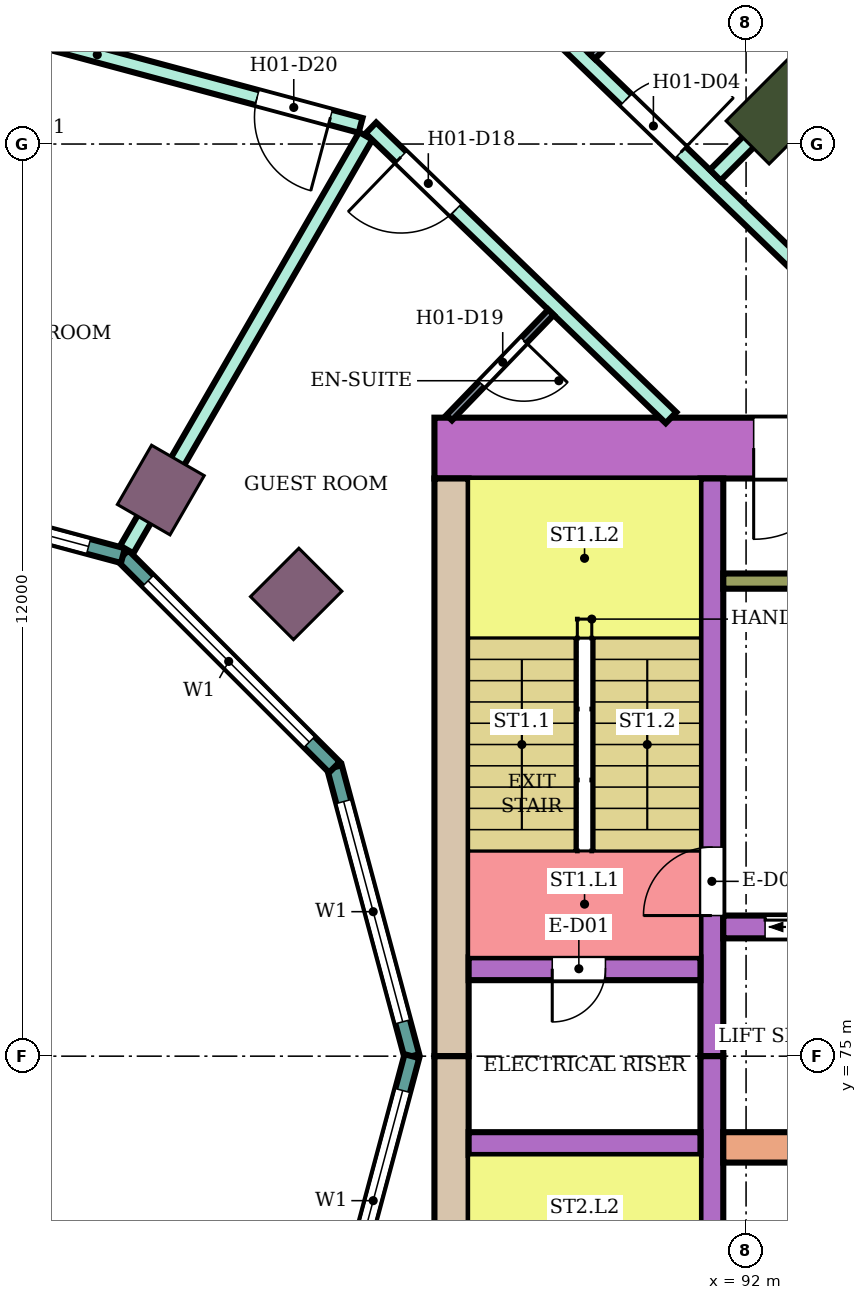
"""IFC4 building model, lengths in metres.
Left out: names, types, materials, properties, quantities, classifications, styles, units other than length and angle.
Written with IfcOpenShell. Run it as: python <this file> out.ifc"""

import sys

from ifc_helpers import new_model, si_unit, direction, frame, frame_2d, origin, origin_2d, place, context, subcontext, project, spatial, rectangle, extrude, element, fill, save


model = new_model("IFC4")
c1 = context("Model", 3, precision=1e-05, world=origin(), true_north=direction((0.0, 1.0)))
c2 = subcontext(c1, "Body", "Model", "MODEL_VIEW")
j1 = project(units=[si_unit("LENGTHUNIT", "METRE"), si_unit("PLANEANGLEUNIT", "RADIAN")], contexts=[c1])
p1 = place(None, origin())
s1 = spatial("IfcSite", under=j1, at=p1, CompositionType="ELEMENT")
p2 = place(p1, origin())
s2 = spatial("IfcBuilding", under=s1, at=p2, CompositionType="ELEMENT")
p3 = place(p2, frame((0.0, 0.0, 32.6)))
s3 = spatial("IfcBuildingStorey", under=s2, at=p3, CompositionType="ELEMENT", Elevation=32.6)
p4 = place(p3, frame((92.445, 87.445, 0.0), z_axis=(0.0, 0.0, 1.0), x_axis=(0.707106781187, 0.707106781187, 0.0)))
e1 = element("IfcColumn", 1, at=p4, inside=s3, PredefinedType="COLUMN", context=c2, shape_type="SweptSolid", body=[
    extrude(rectangle(XDim=1.2, YDim=0.8, at=origin_2d()), origin(), (0.0, 0.0, 1.0), 3.8),
])
for number, where, z_axis, x_axis in (
    (2, (86.081, 81.081, 0.0), (0.0, 0.0, 1.0), (0.707, 0.707, 0.0)),
    (3, (84.3, 82.448, 0.0), (0.0, 0.0, 1.0), (0.5, 0.866, 0.0)),
):
    element("IfcColumn", number, at=place(p3, frame(where, z_axis=z_axis, x_axis=x_axis)), inside=s3, PredefinedType="COLUMN", context=c2, shape_type="SweptSolid", body=[
        extrude(rectangle(XDim=0.9, YDim=0.8, at=origin_2d()), origin(), (0.0, 0.0, 1.0), 3.8),
    ])
p5 = place(p3, frame((87.9, 83.0, 0.0), z_axis=(0.0, 0.0, 1.0), x_axis=(1.0, 0.0, 0.0)))
e4 = element("IfcWall", 4, at=p5, inside=s3, PredefinedType="SHEAR", context=c2, shape_type="SweptSolid", body=[
    extrude(rectangle(XDim=14.7, YDim=0.8, at=frame_2d((7.35, 0.0))), origin(), (0.0, 0.0, 1.0), 3.48),
])
p6 = place(p5, frame((4.2, 0.0, 0.0)))
e5 = element("IfcOpeningElement", 5, at=p6, cuts=e4, PredefinedType="OPENING", context=c2, shape_type="SweptSolid", body=[
    extrude(rectangle(XDim=2.4, YDim=2.4, at=frame_2d((1.2, 1.2))), frame((0.0, 0.41, 0.0), z_axis=(0.0, -1.0, 0.0), x_axis=(1.0, 0.0, 0.0)), (0.0, 0.0, 1.0), 0.82),
])
for number, where, z_axis, x_axis in (
    (6, (88.125, 75.0, 0.0), (0.0, 0.0, 1.0), (0.0, 1.0, 0.0)),
    (7, (88.125, 67.4, 0.0), (0.0, 0.0, 1.0), (0.0, 1.0, 0.0)),
):
    element("IfcWall", number, at=place(p3, frame(where, z_axis=z_axis, x_axis=x_axis)), inside=s3, PredefinedType="SHEAR", context=c2, shape_type="SweptSolid", body=[
        extrude(rectangle(XDim=7.6, YDim=0.45, at=frame_2d((3.8, 0.0))), origin(), (0.0, 0.0, 1.0), 3.48),
    ])
p7 = place(p3, frame((91.55, 75.0, 0.0), z_axis=(0.0, 0.0, 1.0), x_axis=(0.0, 1.0, 0.0)))
e8 = element("IfcWall", 8, at=p7, inside=s3, PredefinedType="SHEAR", context=c2, shape_type="SweptSolid", body=[
    extrude(rectangle(XDim=7.6, YDim=0.3, at=frame_2d((3.8, 0.0))), origin(), (0.0, 0.0, 1.0), 3.48),
])
p8 = place(p7, frame((1.85, 0.0, 0.0)))
e9 = element("IfcOpeningElement", 9, at=p8, cuts=e8, PredefinedType="OPENING", context=c2, shape_type="SweptSolid", body=[
    extrude(rectangle(XDim=0.9, YDim=2.1, at=frame_2d((0.45, 1.05))), frame((0.0, 0.16, 0.0), z_axis=(0.0, -1.0, 0.0), x_axis=(1.0, 0.0, 0.0)), (0.0, 0.0, 1.0), 0.32),
])
p9 = place(p3, frame((91.55, 67.4, 0.0), z_axis=(0.0, 0.0, 1.0), x_axis=(0.0, 1.0, 0.0)))
e10 = element("IfcWall", 10, at=p9, inside=s3, PredefinedType="SHEAR", context=c2, shape_type="SweptSolid", body=[
    extrude(rectangle(XDim=7.6, YDim=0.3, at=frame_2d((3.8, 0.0))), origin(), (0.0, 0.0, 1.0), 3.48),
])
p10 = place(p9, frame((0.25, 0.0, 0.0)))
e11 = element("IfcOpeningElement", 11, at=p10, cuts=e10, PredefinedType="OPENING", context=c2, shape_type="SweptSolid", body=[
    extrude(rectangle(XDim=0.9, YDim=2.1, at=frame_2d((0.45, 1.05))), frame((0.0, 0.16, 0.0), z_axis=(0.0, -1.0, 0.0), x_axis=(1.0, 0.0, 0.0)), (0.0, 0.0, 1.0), 0.32),
])
p11 = place(p3, frame((88.35, 76.15, 0.0), z_axis=(0.0, 0.0, 1.0), x_axis=(1.0, 0.0, 0.0)))
e12 = element("IfcWall", 12, at=p11, inside=s3, PredefinedType="SHEAR", context=c2, shape_type="SweptSolid", body=[
    extrude(rectangle(XDim=3.05, YDim=0.3, at=frame_2d((1.525, 0.0))), origin(), (0.0, 0.0, 1.0), 3.48),
])
p12 = place(p11, frame((1.1, 0.0, 0.0)))
e13 = element("IfcOpeningElement", 13, at=p12, cuts=e12, PredefinedType="OPENING", context=c2, shape_type="SweptSolid", body=[
    extrude(rectangle(XDim=0.7, YDim=2.0, at=frame_2d((0.35, 1.0))), frame((0.0, 0.16, 0.0), z_axis=(0.0, -1.0, 0.0), x_axis=(1.0, 0.0, 0.0)), (0.0, 0.0, 1.0), 0.32),
])
p13 = place(p3, frame((88.35, 73.85, 0.0), z_axis=(0.0, 0.0, 1.0), x_axis=(1.0, 0.0, 0.0)))
e14 = element("IfcWall", 14, at=p13, inside=s3, PredefinedType="SHEAR", context=c2, shape_type="SweptSolid", body=[
    extrude(rectangle(XDim=3.05, YDim=0.3, at=frame_2d((1.525, 0.0))), origin(), (0.0, 0.0, 1.0), 3.48),
])
p14 = place(p3, frame((91.7, 76.7, 0.0), z_axis=(0.0, 0.0, 1.0), x_axis=(1.0, 0.0, 0.0)))
e15 = element("IfcWall", 15, at=p14, inside=s3, PredefinedType="SHEAR", context=c2, shape_type="SweptSolid", body=[
    extrude(rectangle(XDim=10.9, YDim=0.3, at=frame_2d((5.45, 0.0))), origin(), (0.0, 0.0, 1.0), 3.48),
])
p15 = place(p14, frame((0.55, 0.0, 0.0)))
e16 = element("IfcOpeningElement", 16, at=p15, cuts=e15, PredefinedType="OPENING", context=c2, shape_type="SweptSolid", body=[
    extrude(rectangle(XDim=1.1, YDim=2.1, at=frame_2d((0.55, 1.05))), frame((0.0, 0.16, 0.0), z_axis=(0.0, -1.0, 0.0), x_axis=(1.0, 0.0, 0.0)), (0.0, 0.0, 1.0), 0.32),
])
p16 = place(p14, frame((8.1, 0.0, 0.0)))
e17 = element("IfcOpeningElement", 17, at=p16, cuts=e15, PredefinedType="OPENING", context=c2, shape_type="SweptSolid", body=[
    extrude(rectangle(XDim=1.0, YDim=2.1, at=frame_2d((0.5, 1.05))), frame((0.0, 0.16, 0.0), z_axis=(0.0, -1.0, 0.0), x_axis=(1.0, 0.0, 0.0)), (0.0, 0.0, 1.0), 0.32),
])
p17 = place(p3, frame((91.7, 73.8, 0.0), z_axis=(0.0, 0.0, 1.0), x_axis=(1.0, 0.0, 0.0)))
e18 = element("IfcWall", 18, at=p17, inside=s3, PredefinedType="SHEAR", context=c2, shape_type="SweptSolid", body=[
    extrude(rectangle(XDim=10.9, YDim=0.4, at=frame_2d((5.45, 0.0))), origin(), (0.0, 0.0, 1.0), 3.48),
])
p18 = place(p3, frame((91.7, 81.25, 0.0), z_axis=(0.0, 0.0, 1.0), x_axis=(1.0, 0.0, 0.0)))
e19 = element("IfcWall", 19, at=p18, inside=s3, PredefinedType="SHEAR", context=c2, shape_type="SweptSolid", body=[
    extrude(rectangle(XDim=4.65, YDim=0.2, at=frame_2d((2.325, 0.0))), origin(), (0.0, 0.0, 1.0), 3.48),
])
p19 = place(p3, frame((87.604, 75.0, 0.0), z_axis=(0.0, 0.0, 1.0), x_axis=(-0.258789828301, 0.965933654434, 0.0)))
e20 = element("IfcWall", 20, at=p19, inside=s3, PredefinedType="NOTDEFINED", context=c2, shape_type="SweptSolid", body=[
    extrude(rectangle(XDim=3.936, YDim=0.2, at=frame_2d((1.968, 0.0))), origin(), (0.0, 0.0, 1.0), 3.8),
])
p20 = place(p19, frame((0.468, 0.0, 0.9)))
e21 = element("IfcOpeningElement", 21, at=p20, cuts=e20, PredefinedType="OPENING", context=c2, shape_type="SweptSolid", body=[
    extrude(rectangle(XDim=3.0, YDim=2.3, at=frame_2d((1.5, 1.15))), frame((0.0, 0.11, 0.0), z_axis=(0.0, -1.0, 0.0), x_axis=(1.0, 0.0, 0.0)), (0.0, 0.0, 1.0), 0.22),
])
p21 = place(p3, frame((86.585, 78.802, 0.0), z_axis=(0.0, 0.0, 1.0), x_axis=(-0.707106781187, 0.707106781187, 0.0)))
e22 = element("IfcWall", 22, at=p21, inside=s3, PredefinedType="NOTDEFINED", context=c2, shape_type="SweptSolid", body=[
    extrude(rectangle(XDim=3.936, YDim=0.2, at=frame_2d((1.968, 0.0))), origin(), (0.0, 0.0, 1.0), 3.8),
])
p22 = place(p21, frame((0.468, 0.0, 0.9)))
e23 = element("IfcOpeningElement", 23, at=p22, cuts=e22, PredefinedType="OPENING", context=c2, shape_type="SweptSolid", body=[
    extrude(rectangle(XDim=3.0, YDim=2.3, at=frame_2d((1.5, 1.15))), frame((0.0, 0.11, 0.0), z_axis=(0.0, -1.0, 0.0), x_axis=(1.0, 0.0, 0.0)), (0.0, 0.0, 1.0), 0.22),
])
p23 = place(p3, frame((83.802, 81.585, 0.0), z_axis=(0.0, 0.0, 1.0), x_axis=(-0.965933654434, 0.258789828301, 0.0)))
e24 = element("IfcWall", 24, at=p23, inside=s3, PredefinedType="NOTDEFINED", context=c2, shape_type="SweptSolid", body=[
    extrude(rectangle(XDim=3.936, YDim=0.2, at=frame_2d((1.968, 0.0))), origin(), (0.0, 0.0, 1.0), 3.8),
])
p24 = place(p23, frame((0.468, 0.0, 0.9)))
e25 = element("IfcOpeningElement", 25, at=p24, cuts=e24, PredefinedType="OPENING", context=c2, shape_type="SweptSolid", body=[
    extrude(rectangle(XDim=3.0, YDim=2.3, at=frame_2d((1.5, 1.15))), frame((0.0, 0.11, 0.0), z_axis=(0.0, -1.0, 0.0), x_axis=(1.0, 0.0, 0.0)), (0.0, 0.0, 1.0), 0.22),
])
p25 = place(p3, frame((86.585, 71.198, 0.0), z_axis=(0.0, 0.0, 1.0), x_axis=(0.258789828301, 0.965933654434, 0.0)))
e26 = element("IfcWall", 26, at=p25, inside=s3, PredefinedType="NOTDEFINED", context=c2, shape_type="SweptSolid", body=[
    extrude(rectangle(XDim=3.936, YDim=0.2, at=frame_2d((1.968, 0.0))), origin(), (0.0, 0.0, 1.0), 3.8),
])
p26 = place(p25, frame((0.468, 0.0, 0.9)))
e27 = element("IfcOpeningElement", 27, at=p26, cuts=e26, PredefinedType="OPENING", context=c2, shape_type="SweptSolid", body=[
    extrude(rectangle(XDim=3.0, YDim=2.3, at=frame_2d((1.5, 1.15))), frame((0.0, 0.11, 0.0), z_axis=(0.0, -1.0, 0.0), x_axis=(1.0, 0.0, 0.0)), (0.0, 0.0, 1.0), 0.22),
])
p27 = place(p3, frame((80.0, 89.104, 0.0), z_axis=(0.0, 0.0, 1.0), x_axis=(0.965856548257, -0.259077455964, 0.0)))
e28 = element("IfcWall", 28, at=p27, inside=s3, PredefinedType="PARTITIONING", context=c2, shape_type="SweptSolid", body=[
    extrude(rectangle(XDim=7.173, YDim=0.2, at=frame_2d((3.586, 0.0))), origin(), (0.0, 0.0, 1.0), 3.35),
])
p28 = place(p27, frame((5.763, 0.0, 0.0)))
e29 = element("IfcOpeningElement", 29, at=p28, cuts=e28, PredefinedType="OPENING", context=c2, shape_type="SweptSolid", body=[
    extrude(rectangle(XDim=1.0, YDim=2.1, at=frame_2d((0.5, 1.05))), frame((0.0, 0.11, 0.0), z_axis=(0.0, -1.0, 0.0), x_axis=(1.0, 0.0, 0.0)), (0.0, 0.0, 1.0), 0.22),
])
p29 = place(p3, frame((83.852, 81.665, 0.0), z_axis=(0.0, 0.0, 1.0), x_axis=(0.500253653624, 0.865878907259, 0.0)))
e30 = element("IfcWall", 30, at=p29, inside=s3, PredefinedType="PARTITIONING", context=c2, shape_type="SweptSolid", body=[
    extrude(rectangle(XDim=6.285, YDim=0.2, at=frame_2d((3.143, 0.0))), origin(), (0.0, 0.0, 1.0), 3.35),
])
p30 = place(p3, frame((87.064, 87.211, 0.0), z_axis=(0.0, 0.0, 1.0), x_axis=(0.719540958932, -0.694450004262, 0.0)))
e31 = element("IfcWall", 31, at=p30, inside=s3, PredefinedType="PARTITIONING", context=c2, shape_type="SweptSolid", body=[
    extrude(rectangle(XDim=5.488, YDim=0.2, at=frame_2d((2.744, 0.0))), origin(), (0.0, 0.0, 1.0), 3.35),
])
p31 = place(p30, frame((0.55, 0.0, 0.0)))
e32 = element("IfcOpeningElement", 32, at=p31, cuts=e31, PredefinedType="OPENING", context=c2, shape_type="SweptSolid", body=[
    extrude(rectangle(XDim=1.0, YDim=2.1, at=frame_2d((0.5, 1.05))), frame((0.0, 0.11, 0.0), z_axis=(0.0, -1.0, 0.0), x_axis=(1.0, 0.0, 0.0)), (0.0, 0.0, 1.0), 0.22),
])
p32 = place(p3, frame((88.465, 89.473, 0.0), z_axis=(0.0, 0.0, 1.0), x_axis=(0.719457552421, -0.694536413922, 0.0)))
e33 = element("IfcWall", 33, at=p32, inside=s3, PredefinedType="PARTITIONING", context=c2, shape_type="SweptSolid", body=[
    extrude(rectangle(XDim=6.524, YDim=0.2, at=frame_2d((3.262, 0.0))), origin(), (0.0, 0.0, 1.0), 3.35),
])
p33 = place(p32, frame((2.719, 0.0, 0.0)))
e34 = element("IfcOpeningElement", 34, at=p33, cuts=e33, PredefinedType="OPENING", context=c2, shape_type="SweptSolid", body=[
    extrude(rectangle(XDim=1.0, YDim=2.1, at=frame_2d((0.5, 1.05))), frame((0.0, 0.11, 0.0), z_axis=(0.0, -1.0, 0.0), x_axis=(1.0, 0.0, 0.0)), (0.0, 0.0, 1.0), 0.22),
])
p34 = place(p3, frame((91.594, 86.591, 0.0), z_axis=(0.0, 0.0, 1.0), x_axis=(0.707214399597, 0.706999146394, 0.0)))
e35 = element("IfcWall", 35, at=p34, inside=s3, PredefinedType="PARTITIONING", context=c2, shape_type="SweptSolid", body=[
    extrude(rectangle(XDim=6.805, YDim=0.2, at=frame_2d((3.403, 0.0))), origin(), (0.0, 0.0, 1.0), 3.35),
])
p35 = place(p3, frame((88.095, 83.4, 0.0), z_axis=(0.0, 0.0, 1.0), x_axis=(0.694447472534, 0.719543402368, 0.0)))
e36 = element("IfcWall", 36, at=p35, inside=s3, PredefinedType="PARTITIONING", context=c2, shape_type="SweptSolid", body=[
    extrude(rectangle(XDim=1.926, YDim=0.1, at=frame_2d((0.963, 0.0))), origin(), (0.0, 0.0, 1.0), 3.35),
])
p36 = place(p35, frame((0.613, 0.0, 0.0)))
e37 = element("IfcOpeningElement", 37, at=p36, cuts=e36, PredefinedType="OPENING", context=c2, shape_type="SweptSolid", body=[
    extrude(rectangle(XDim=0.8, YDim=2.1, at=frame_2d((0.4, 1.05))), frame((0.0, 0.06, 0.0), z_axis=(0.0, -1.0, 0.0), x_axis=(1.0, 0.0, 0.0)), (0.0, 0.0, 1.0), 0.12),
])
p37 = place(p3, frame((89.976, 88.154, 0.0), z_axis=(0.0, 0.0, 1.0), x_axis=(0.6945137956, 0.719479386585, 0.0)))
e38 = element("IfcWall", 38, at=p37, inside=s3, PredefinedType="PARTITIONING", context=c2, shape_type="SweptSolid", body=[
    extrude(rectangle(XDim=2.699, YDim=0.1, at=frame_2d((1.35, 0.0))), origin(), (0.0, 0.0, 1.0), 3.35),
])
p38 = place(p37, frame((0.9, 0.0, 0.0)))
e39 = element("IfcOpeningElement", 39, at=p38, cuts=e38, PredefinedType="OPENING", context=c2, shape_type="SweptSolid", body=[
    extrude(rectangle(XDim=0.8, YDim=2.1, at=frame_2d((0.4, 1.05))), frame((0.0, 0.06, 0.0), z_axis=(0.0, -1.0, 0.0), x_axis=(1.0, 0.0, 0.0)), (0.0, 0.0, 1.0), 0.12),
])
p39 = place(p20, origin())
e40 = element("IfcWindow", 40, at=p39, inside=s3, PartitioningType="SINGLE_PANEL", PredefinedType="WINDOW", context=c2, shape_type="SweptSolid", body=[
    extrude(rectangle(XDim=3.0, YDim=2.3, at=frame_2d((1.5, 1.15))), frame((0.0, 0.03, 0.0), z_axis=(0.0, -1.0, 0.0), x_axis=(1.0, 0.0, 0.0)), (0.0, 0.0, 1.0), 0.06),
])
fill(e21, e40)
p40 = place(p22, origin())
e41 = element("IfcWindow", 41, at=p40, inside=s3, PartitioningType="SINGLE_PANEL", PredefinedType="WINDOW", context=c2, shape_type="SweptSolid", body=[
    extrude(rectangle(XDim=3.0, YDim=2.3, at=frame_2d((1.5, 1.15))), frame((0.0, 0.03, 0.0), z_axis=(0.0, -1.0, 0.0), x_axis=(1.0, 0.0, 0.0)), (0.0, 0.0, 1.0), 0.06),
])
fill(e23, e41)
p41 = place(p24, origin())
e42 = element("IfcWindow", 42, at=p41, inside=s3, PartitioningType="SINGLE_PANEL", PredefinedType="WINDOW", context=c2, shape_type="SweptSolid", body=[
    extrude(rectangle(XDim=3.0, YDim=2.3, at=frame_2d((1.5, 1.15))), frame((0.0, 0.03, 0.0), z_axis=(0.0, -1.0, 0.0), x_axis=(1.0, 0.0, 0.0)), (0.0, 0.0, 1.0), 0.06),
])
fill(e25, e42)
p42 = place(p26, origin())
e43 = element("IfcWindow", 43, at=p42, inside=s3, PartitioningType="SINGLE_PANEL", PredefinedType="WINDOW", context=c2, shape_type="SweptSolid", body=[
    extrude(rectangle(XDim=3.0, YDim=2.3, at=frame_2d((1.5, 1.15))), frame((0.0, 0.03, 0.0), z_axis=(0.0, -1.0, 0.0), x_axis=(1.0, 0.0, 0.0)), (0.0, 0.0, 1.0), 0.06),
])
fill(e27, e43)
p43 = place(p33, origin())
e44 = element("IfcDoor", 44, at=p43, inside=s3, OperationType="SINGLE_SWING_RIGHT", PredefinedType="DOOR", context=c2, shape_type="SweptSolid", body=[
    extrude(rectangle(XDim=1.0, YDim=2.1, at=frame_2d((0.5, 1.05))), frame((0.0, 0.025, 0.0), z_axis=(0.0, -1.0, 0.0), x_axis=(1.0, 0.0, 0.0)), (0.0, 0.0, 1.0), 0.05),
])
fill(e34, e44)
p44 = place(p31, frame((1.0, 0.0, 0.0), z_axis=(0.0, 0.0, 1.0), x_axis=(-1.0, 0.0, 0.0)))
e45 = element("IfcDoor", 45, at=p44, inside=s3, OperationType="SINGLE_SWING_RIGHT", PredefinedType="DOOR", context=c2, shape_type="SweptSolid", body=[
    extrude(rectangle(XDim=1.0, YDim=2.1, at=frame_2d((0.5, 1.05))), frame((0.0, 0.025, 0.0), z_axis=(0.0, -1.0, 0.0), x_axis=(1.0, 0.0, 0.0)), (0.0, 0.0, 1.0), 0.05),
])
fill(e32, e45)
p45 = place(p36, frame((0.8, 0.0, 0.0), z_axis=(0.0, 0.0, 1.0), x_axis=(-1.0, 0.0, 0.0)))
e46 = element("IfcDoor", 46, at=p45, inside=s3, OperationType="SINGLE_SWING_LEFT", PredefinedType="DOOR", context=c2, shape_type="SweptSolid", body=[
    extrude(rectangle(XDim=0.8, YDim=2.1, at=frame_2d((0.4, 1.05))), frame((0.0, 0.025, 0.0), z_axis=(0.0, -1.0, 0.0), x_axis=(1.0, 0.0, 0.0)), (0.0, 0.0, 1.0), 0.05),
])
fill(e37, e46)
p46 = place(p28, frame((1.0, 0.0, 0.0), z_axis=(0.0, 0.0, 1.0), x_axis=(-1.0, 0.0, 0.0)))
e47 = element("IfcDoor", 47, at=p46, inside=s3, OperationType="SINGLE_SWING_LEFT", PredefinedType="DOOR", context=c2, shape_type="SweptSolid", body=[
    extrude(rectangle(XDim=1.0, YDim=2.1, at=frame_2d((0.5, 1.05))), frame((0.0, 0.025, 0.0), z_axis=(0.0, -1.0, 0.0), x_axis=(1.0, 0.0, 0.0)), (0.0, 0.0, 1.0), 0.05),
])
fill(e29, e47)
p47 = place(p12, frame((0.7, 0.0, 0.0), z_axis=(0.0, 0.0, 1.0), x_axis=(-1.0, 0.0, 0.0)))
e48 = element("IfcDoor", 48, at=p47, inside=s3, OperationType="SINGLE_SWING_RIGHT", PredefinedType="DOOR", context=c2, shape_type="SweptSolid", body=[
    extrude(rectangle(XDim=0.7, YDim=2.0, at=frame_2d((0.35, 1.0))), frame((0.0, 0.025, 0.0), z_axis=(0.0, -1.0, 0.0), x_axis=(1.0, 0.0, 0.0)), (0.0, 0.0, 1.0), 0.05),
])
fill(e13, e48)
p48 = place(p8, origin())
e49 = element("IfcDoor", 49, at=p48, inside=s3, OperationType="SINGLE_SWING_LEFT", PredefinedType="DOOR", context=c2, shape_type="SweptSolid", body=[
    extrude(rectangle(XDim=0.9, YDim=2.1, at=frame_2d((0.45, 1.05))), frame((0.0, 0.025, 0.0), z_axis=(0.0, -1.0, 0.0), x_axis=(1.0, 0.0, 0.0)), (0.0, 0.0, 1.0), 0.05),
])
fill(e9, e49)
p49 = place(p15, origin())
e50 = element("IfcDoor", 50, at=p49, inside=s3, OperationType="DOUBLE_DOOR_SLIDING", PredefinedType="DOOR", context=c2, shape_type="SweptSolid", body=[
    extrude(rectangle(XDim=1.1, YDim=2.1, at=frame_2d((0.55, 1.05))), frame((0.0, 0.025, 0.0), z_axis=(0.0, -1.0, 0.0), x_axis=(1.0, 0.0, 0.0)), (0.0, 0.0, 1.0), 0.05),
])
fill(e16, e50)
p50 = place(p6, frame((2.4, 0.0, 0.0), z_axis=(0.0, 0.0, 1.0), x_axis=(-1.0, 0.0, 0.0)))
e51 = element("IfcDoor", 51, at=p50, inside=s3, OperationType="DOUBLE_DOOR_SINGLE_SWING", PredefinedType="DOOR", context=c2, shape_type="SweptSolid", body=[
    extrude(rectangle(XDim=2.4, YDim=2.4, at=frame_2d((1.2, 1.2))), frame((0.0, 0.025, 0.0), z_axis=(0.0, -1.0, 0.0), x_axis=(1.0, 0.0, 0.0)), (0.0, 0.0, 1.0), 0.05),
])
fill(e5, e51)
save(model, sys.argv[1])
